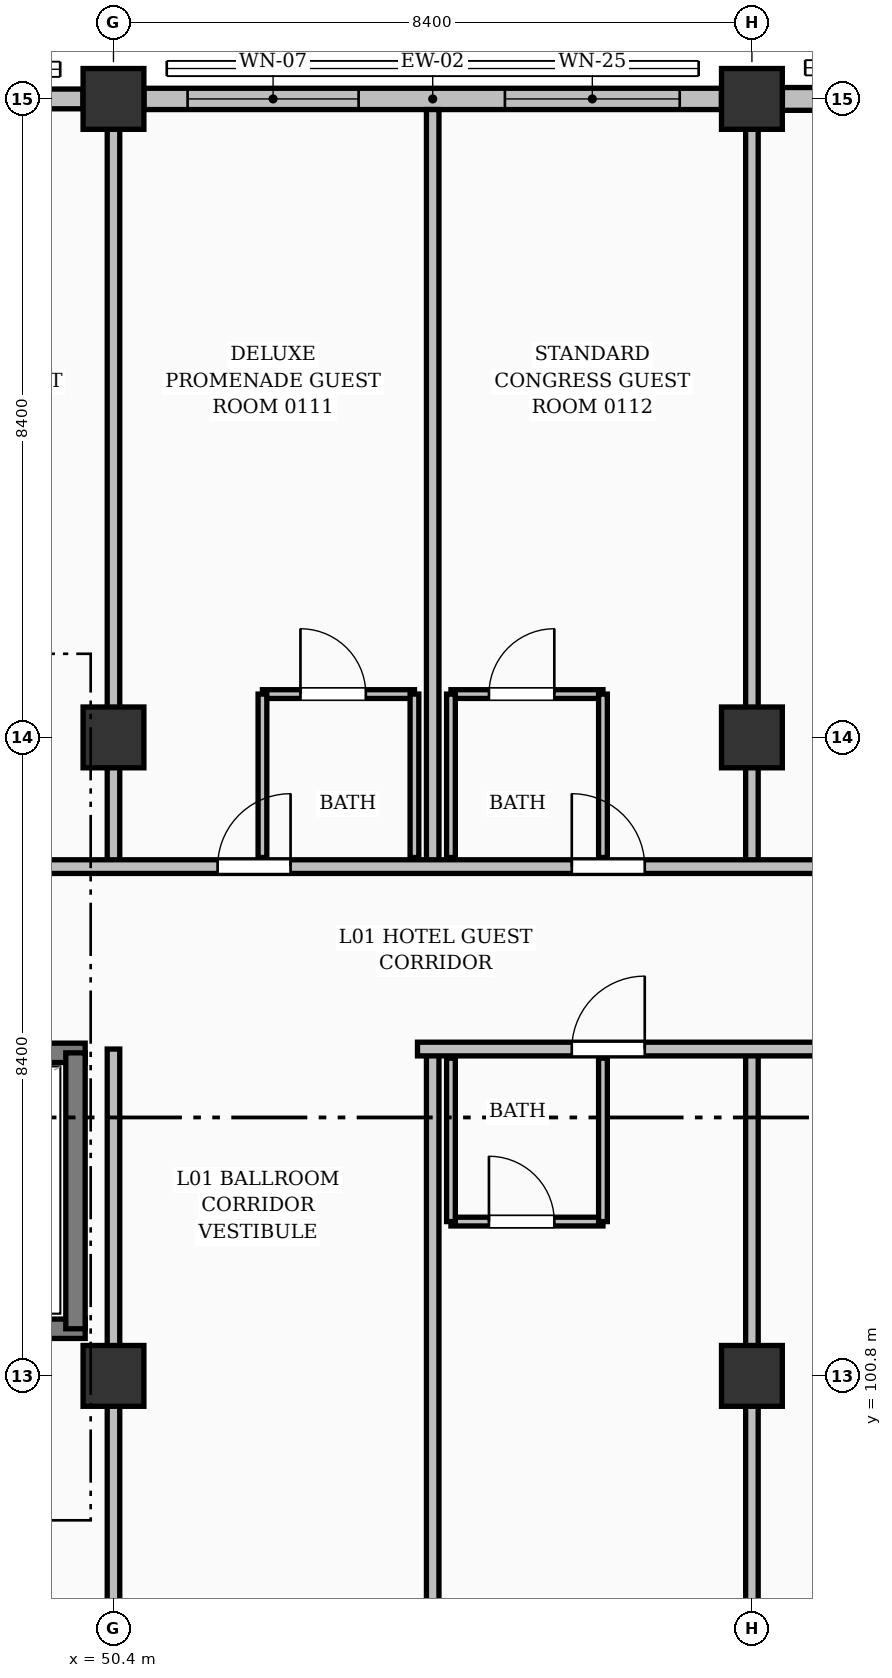
"""IFC4 building model, lengths in metres.
Left out: names, types, materials, properties, quantities, classifications, styles, units other than length and angle.
Written with IfcOpenShell. Run it as: python <this file> out.ifc"""

import sys

from ifc_helpers import new_model, si_unit, direction, frame, frame_2d, origin, origin_2d, place, context, subcontext, project, spatial, rectangle, extrude, element, fill, save


model = new_model("IFC4")
c1 = context("Model", 3, precision=1e-05, world=origin(), true_north=direction((0.0, 1.0)))
c2 = subcontext(c1, "Body", "Model", "MODEL_VIEW")
j1 = project(units=[si_unit("LENGTHUNIT", "METRE"), si_unit("PLANEANGLEUNIT", "RADIAN")], contexts=[c1])
p1 = place(None, origin())
s1 = spatial("IfcSite", under=j1, at=p1, CompositionType="ELEMENT")
p2 = place(p1, origin())
s2 = spatial("IfcBuilding", under=s1, at=p2, CompositionType="ELEMENT")
p3 = place(p2, frame((0.0, 0.0, 3.92)))
s3 = spatial("IfcBuildingStorey", under=s2, at=p3, CompositionType="ELEMENT", Elevation=3.92)
for number, where, z_axis, x_axis in (
    (1, (50.4, 100.8, 0.0), (0.0, 0.0, 1.0), (1.0, 0.0, 0.0)),
    (2, (50.4, 109.2, 0.0), (0.0, 0.0, 1.0), (1.0, 0.0, 0.0)),
    (3, (50.4, 117.6, 0.0), (0.0, 0.0, 1.0), (1.0, 0.0, 0.0)),
    (4, (58.8, 100.8, 0.0), (0.0, 0.0, 1.0), (1.0, 0.0, 0.0)),
    (5, (58.8, 109.2, 0.0), (0.0, 0.0, 1.0), (1.0, 0.0, 0.0)),
    (6, (58.8, 117.6, 0.0), (0.0, 0.0, 1.0), (1.0, 0.0, 0.0)),
):
    element("IfcColumn", number, at=place(p3, frame(where, z_axis=z_axis, x_axis=x_axis)), inside=s3, PredefinedType="COLUMN", context=c2, shape_type="SweptSolid", body=[
        extrude(rectangle(XDim=0.8, YDim=0.8, at=origin_2d()), origin(), (0.0, 0.0, 1.0), 3.64),
    ])
p4 = place(p3, frame((42.401, 117.6, 0.0), z_axis=(0.0, 0.0, 1.0), x_axis=(1.0, 0.0, 0.0)))
e7 = element("IfcWall", 7, at=p4, inside=s3, PredefinedType="SOLIDWALL", context=c2, shape_type="SweptSolid", body=[
    extrude(rectangle(XDim=7.598, YDim=0.26, at=frame_2d((3.799, 0.0))), origin(), (0.0, 0.0, 1.0), 2.445),
])
p5 = place(p4, frame((0.574, 0.0, 0.25)))
e8 = element("IfcOpeningElement", 8, at=p5, cuts=e7, PredefinedType="OPENING", context=c2, shape_type="SweptSolid", body=[
    extrude(rectangle(XDim=2.25, YDim=1.85, at=frame_2d((1.125, 0.925))), frame((0.0, 0.14, 0.0), z_axis=(0.0, -1.0, 0.0), x_axis=(1.0, 0.0, 0.0)), (0.0, 0.0, 1.0), 0.28),
])
p6 = place(p4, frame((4.774, 0.0, 0.25)))
e9 = element("IfcOpeningElement", 9, at=p6, cuts=e7, PredefinedType="OPENING", context=c2, shape_type="SweptSolid", body=[
    extrude(rectangle(XDim=2.25, YDim=1.95, at=frame_2d((1.125, 0.975))), frame((0.0, 0.14, 0.0), z_axis=(0.0, -1.0, 0.0), x_axis=(1.0, 0.0, 0.0)), (0.0, 0.0, 1.0), 0.28),
])
p7 = place(p3, frame((50.801, 117.6, 0.0), z_axis=(0.0, 0.0, 1.0), x_axis=(1.0, 0.0, 0.0)))
e10 = element("IfcWall", 10, at=p7, inside=s3, PredefinedType="SOLIDWALL", context=c2, shape_type="SweptSolid", body=[
    extrude(rectangle(XDim=7.598, YDim=0.28, at=frame_2d((3.799, 0.0))), origin(), (0.0, 0.0, 1.0), 2.445),
])
p8 = place(p7, frame((0.574, 0.0, 0.25)))
e11 = element("IfcOpeningElement", 11, at=p8, cuts=e10, PredefinedType="OPENING", context=c2, shape_type="SweptSolid", body=[
    extrude(rectangle(XDim=2.25, YDim=1.95, at=frame_2d((1.125, 0.975))), frame((0.0, 0.15, 0.0), z_axis=(0.0, -1.0, 0.0), x_axis=(1.0, 0.0, 0.0)), (0.0, 0.0, 1.0), 0.3),
])
p9 = place(p7, frame((4.749, 0.0, 0.25)))
e12 = element("IfcOpeningElement", 12, at=p9, cuts=e10, PredefinedType="OPENING", context=c2, shape_type="SweptSolid", body=[
    extrude(rectangle(XDim=2.3, YDim=1.75, at=frame_2d((1.15, 0.875))), frame((0.0, 0.15, 0.0), z_axis=(0.0, -1.0, 0.0), x_axis=(1.0, 0.0, 0.0)), (0.0, 0.0, 1.0), 0.3),
])
p10 = place(p3, frame((59.201, 117.6, 0.0), z_axis=(0.0, 0.0, 1.0), x_axis=(1.0, 0.0, 0.0)))
e13 = element("IfcWall", 13, at=p10, inside=s3, PredefinedType="SOLIDWALL", context=c2, shape_type="SweptSolid", body=[
    extrude(rectangle(XDim=7.598, YDim=0.3, at=frame_2d((3.799, 0.0))), origin(), (0.0, 0.0, 1.0), 2.445),
])
p11 = place(p10, frame((0.549, 0.0, 0.25)))
e14 = element("IfcOpeningElement", 14, at=p11, cuts=e13, PredefinedType="OPENING", context=c2, shape_type="SweptSolid", body=[
    extrude(rectangle(XDim=2.3, YDim=1.75, at=frame_2d((1.15, 0.875))), frame((0.0, 0.16, 0.0), z_axis=(0.0, -1.0, 0.0), x_axis=(1.0, 0.0, 0.0)), (0.0, 0.0, 1.0), 0.32),
])
p12 = place(p10, frame((4.789, 0.0, 0.25)))
e15 = element("IfcOpeningElement", 15, at=p12, cuts=e13, PredefinedType="OPENING", context=c2, shape_type="SweptSolid", body=[
    extrude(rectangle(XDim=2.22, YDim=1.9, at=frame_2d((1.11, 0.95))), frame((0.0, 0.16, 0.0), z_axis=(0.0, -1.0, 0.0), x_axis=(1.0, 0.0, 0.0)), (0.0, 0.0, 1.0), 0.32),
])
p13 = place(p3, frame((41.802, 101.42, 0.0), z_axis=(0.0, 0.0, 1.0), x_axis=(1.0, 0.0, 0.0)))
e16 = element("IfcWall", 16, at=p13, inside=s3, PredefinedType="SOLIDWALL", context=c2, shape_type="SweptSolid", body=[
    extrude(rectangle(XDim=8.225, YDim=0.255, at=frame_2d((4.113, 0.0))), origin(), (0.0, 0.0, 1.0), 3.36),
])
p14 = place(p3, frame((41.802, 105.05, 0.0), z_axis=(0.0, 0.0, 1.0), x_axis=(1.0, 0.0, 0.0)))
e17 = element("IfcWall", 17, at=p14, inside=s3, PredefinedType="SOLIDWALL", context=c2, shape_type="SweptSolid", body=[
    extrude(rectangle(XDim=8.225, YDim=0.255, at=frame_2d((4.113, 0.0))), origin(), (0.0, 0.0, 1.0), 3.36),
])
p15 = place(p14, frame((0.35, 0.0, 0.0)))
e18 = element("IfcOpeningElement", 18, at=p15, cuts=e17, PredefinedType="OPENING", context=c2, shape_type="SweptSolid", body=[
    extrude(rectangle(XDim=1.16, YDim=2.15, at=frame_2d((0.58, 1.075))), frame((0.0, 0.137, 0.0), z_axis=(0.0, -1.0, 0.0), x_axis=(1.0, 0.0, 0.0)), (0.0, 0.0, 1.0), 0.275),
])
p16 = place(p3, frame((49.9, 101.42, 0.0), z_axis=(0.0, 0.0, 1.0), x_axis=(0.0, 1.0, 0.0)))
e19 = element("IfcWall", 19, at=p16, inside=s3, PredefinedType="SOLIDWALL", context=c2, shape_type="SweptSolid", body=[
    extrude(rectangle(XDim=3.63, YDim=0.255, at=frame_2d((1.815, 0.0))), origin(), (0.0, 0.0, 1.0), 3.36),
])
p17 = place(p3, frame((52.36, 109.77, 0.0), z_axis=(0.0, 0.0, 1.0), x_axis=(1.0, 0.0, 0.0)))
e20 = element("IfcWall", 20, at=p17, inside=s3, PredefinedType="PARTITIONING", context=c2, shape_type="SweptSolid", body=[
    extrude(rectangle(XDim=2.0, YDim=0.115, at=frame_2d((1.0, 0.0))), origin(), (0.0, 0.0, 1.0), 3.36),
])
p18 = place(p17, frame((0.5, 0.0, 0.0)))
e21 = element("IfcOpeningElement", 21, at=p18, cuts=e20, PredefinedType="OPENING", context=c2, shape_type="SweptSolid", body=[
    extrude(rectangle(XDim=0.86, YDim=2.05, at=frame_2d((0.43, 1.025))), frame((0.0, 0.067, 0.0), z_axis=(0.0, -1.0, 0.0), x_axis=(1.0, 0.0, 0.0)), (0.0, 0.0, 1.0), 0.135),
])
for number, where, z_axis, x_axis in (
    (22, (52.36, 107.62, 0.0), (0.0, 0.0, 1.0), (0.0, 1.0, 0.0)),
    (23, (54.36, 107.62, 0.0), (0.0, 0.0, 1.0), (0.0, 1.0, 0.0)),
):
    element("IfcWall", number, at=place(p3, frame(where, z_axis=z_axis, x_axis=x_axis)), inside=s3, PredefinedType="PARTITIONING", context=c2, shape_type="SweptSolid", body=[
        extrude(rectangle(XDim=2.15, YDim=0.115, at=frame_2d((1.075, 0.0))), origin(), (0.0, 0.0, 1.0), 3.36),
    ])
p19 = place(p3, frame((54.84, 109.77, 0.0), z_axis=(0.0, 0.0, 1.0), x_axis=(1.0, 0.0, 0.0)))
e24 = element("IfcWall", 24, at=p19, inside=s3, PredefinedType="PARTITIONING", context=c2, shape_type="SweptSolid", body=[
    extrude(rectangle(XDim=2.0, YDim=0.115, at=frame_2d((1.0, 0.0))), origin(), (0.0, 0.0, 1.0), 3.36),
])
p20 = place(p19, frame((0.5, 0.0, 0.0)))
e25 = element("IfcOpeningElement", 25, at=p20, cuts=e24, PredefinedType="OPENING", context=c2, shape_type="SweptSolid", body=[
    extrude(rectangle(XDim=0.86, YDim=2.05, at=frame_2d((0.43, 1.025))), frame((0.0, 0.067, 0.0), z_axis=(0.0, -1.0, 0.0), x_axis=(1.0, 0.0, 0.0)), (0.0, 0.0, 1.0), 0.135),
])
for number, where, z_axis, x_axis in (
    (26, (54.84, 107.62, 0.0), (0.0, 0.0, 1.0), (0.0, 1.0, 0.0)),
    (27, (56.84, 107.62, 0.0), (0.0, 0.0, 1.0), (0.0, 1.0, 0.0)),
):
    element("IfcWall", number, at=place(p3, frame(where, z_axis=z_axis, x_axis=x_axis)), inside=s3, PredefinedType="PARTITIONING", context=c2, shape_type="SweptSolid", body=[
        extrude(rectangle(XDim=2.15, YDim=0.115, at=frame_2d((1.075, 0.0))), origin(), (0.0, 0.0, 1.0), 3.36),
    ])
p21 = place(p3, frame((54.6, 107.5, 0.0), z_axis=(0.0, 0.0, 1.0), x_axis=(0.0, 1.0, 0.0)))
e28 = element("IfcWall", 28, at=p21, inside=s3, PredefinedType="PARTITIONING", context=c2, shape_type="SweptSolid", body=[
    extrude(rectangle(XDim=9.96, YDim=0.165, at=frame_2d((4.98, 0.0))), origin(), (0.0, 0.0, 1.0), 3.36),
])
for number, where, z_axis, x_axis in (
    (29, (50.4, 107.5, 0.0), (0.0, 0.0, 1.0), (0.0, 1.0, 0.0)),
    (30, (58.8, 107.5, 0.0), (0.0, 0.0, 1.0), (0.0, 1.0, 0.0)),
):
    element("IfcWall", number, at=place(p3, frame(where, z_axis=z_axis, x_axis=x_axis)), inside=s3, PredefinedType="PARTITIONING", context=c2, shape_type="SweptSolid", body=[
        extrude(rectangle(XDim=9.75, YDim=0.165, at=frame_2d((4.875, 0.0))), origin(), (0.0, 0.0, 1.0), 2.495),
    ])
p22 = place(p3, frame((40.66, 107.5, 0.0), z_axis=(0.0, 0.0, 1.0), x_axis=(1.0, 0.0, 0.0)))
e31 = element("IfcWall", 31, at=p22, inside=s3, PredefinedType="PARTITIONING", context=c2, shape_type="SweptSolid", body=[
    extrude(rectangle(XDim=43.15, YDim=0.18, at=frame_2d((21.575, 0.0))), origin(), (0.0, 0.0, 1.0), 3.36),
])
p23 = place(p22, frame((0.2, 0.0, 0.0)))
e32 = element("IfcOpeningElement", 32, at=p23, cuts=e31, PredefinedType="OPENING", context=c2, shape_type="SweptSolid", body=[
    extrude(rectangle(XDim=0.94, YDim=2.1, at=frame_2d((0.47, 1.05))), frame((0.0, 0.1, 0.0), z_axis=(0.0, -1.0, 0.0), x_axis=(1.0, 0.0, 0.0)), (0.0, 0.0, 1.0), 0.2),
])
p24 = place(p22, frame((2.71, 0.0, 0.0)))
e33 = element("IfcOpeningElement", 33, at=p24, cuts=e31, PredefinedType="OPENING", context=c2, shape_type="SweptSolid", body=[
    extrude(rectangle(XDim=0.96, YDim=2.15, at=frame_2d((0.48, 1.075))), frame((0.0, 0.1, 0.0), z_axis=(0.0, -1.0, 0.0), x_axis=(1.0, 0.0, 0.0)), (0.0, 0.0, 1.0), 0.2),
])
p25 = place(p22, frame((7.37, 0.0, 0.0)))
e34 = element("IfcOpeningElement", 34, at=p25, cuts=e31, PredefinedType="OPENING", context=c2, shape_type="SweptSolid", body=[
    extrude(rectangle(XDim=0.96, YDim=2.15, at=frame_2d((0.48, 1.075))), frame((0.0, 0.1, 0.0), z_axis=(0.0, -1.0, 0.0), x_axis=(1.0, 0.0, 0.0)), (0.0, 0.0, 1.0), 0.2),
])
p26 = place(p22, frame((11.11, 0.0, 0.0)))
e35 = element("IfcOpeningElement", 35, at=p26, cuts=e31, PredefinedType="OPENING", context=c2, shape_type="SweptSolid", body=[
    extrude(rectangle(XDim=0.96, YDim=2.15, at=frame_2d((0.48, 1.075))), frame((0.0, 0.1, 0.0), z_axis=(0.0, -1.0, 0.0), x_axis=(1.0, 0.0, 0.0)), (0.0, 0.0, 1.0), 0.2),
])
p27 = place(p22, frame((15.77, 0.0, 0.0)))
e36 = element("IfcOpeningElement", 36, at=p27, cuts=e31, PredefinedType="OPENING", context=c2, shape_type="SweptSolid", body=[
    extrude(rectangle(XDim=0.96, YDim=2.15, at=frame_2d((0.48, 1.075))), frame((0.0, 0.1, 0.0), z_axis=(0.0, -1.0, 0.0), x_axis=(1.0, 0.0, 0.0)), (0.0, 0.0, 1.0), 0.2),
])
p28 = place(p22, frame((19.51, 0.0, 0.0)))
e37 = element("IfcOpeningElement", 37, at=p28, cuts=e31, PredefinedType="OPENING", context=c2, shape_type="SweptSolid", body=[
    extrude(rectangle(XDim=0.96, YDim=2.15, at=frame_2d((0.48, 1.075))), frame((0.0, 0.1, 0.0), z_axis=(0.0, -1.0, 0.0), x_axis=(1.0, 0.0, 0.0)), (0.0, 0.0, 1.0), 0.2),
])
p29 = place(p22, frame((24.17, 0.0, 0.0)))
e38 = element("IfcOpeningElement", 38, at=p29, cuts=e31, PredefinedType="OPENING", context=c2, shape_type="SweptSolid", body=[
    extrude(rectangle(XDim=0.96, YDim=2.15, at=frame_2d((0.48, 1.075))), frame((0.0, 0.1, 0.0), z_axis=(0.0, -1.0, 0.0), x_axis=(1.0, 0.0, 0.0)), (0.0, 0.0, 1.0), 0.2),
])
p30 = place(p22, frame((27.91, 0.0, 0.0)))
e39 = element("IfcOpeningElement", 39, at=p30, cuts=e31, PredefinedType="OPENING", context=c2, shape_type="SweptSolid", body=[
    extrude(rectangle(XDim=0.96, YDim=2.15, at=frame_2d((0.48, 1.075))), frame((0.0, 0.1, 0.0), z_axis=(0.0, -1.0, 0.0), x_axis=(1.0, 0.0, 0.0)), (0.0, 0.0, 1.0), 0.2),
])
p31 = place(p22, frame((32.57, 0.0, 0.0)))
e40 = element("IfcOpeningElement", 40, at=p31, cuts=e31, PredefinedType="OPENING", context=c2, shape_type="SweptSolid", body=[
    extrude(rectangle(XDim=0.96, YDim=2.15, at=frame_2d((0.48, 1.075))), frame((0.0, 0.1, 0.0), z_axis=(0.0, -1.0, 0.0), x_axis=(1.0, 0.0, 0.0)), (0.0, 0.0, 1.0), 0.2),
])
p32 = place(p22, frame((36.31, 0.0, 0.0)))
e41 = element("IfcOpeningElement", 41, at=p32, cuts=e31, PredefinedType="OPENING", context=c2, shape_type="SweptSolid", body=[
    extrude(rectangle(XDim=0.96, YDim=2.15, at=frame_2d((0.48, 1.075))), frame((0.0, 0.1, 0.0), z_axis=(0.0, -1.0, 0.0), x_axis=(1.0, 0.0, 0.0)), (0.0, 0.0, 1.0), 0.2),
])
p33 = place(p22, frame((40.97, 0.0, 0.0)))
e42 = element("IfcOpeningElement", 42, at=p33, cuts=e31, PredefinedType="OPENING", context=c2, shape_type="SweptSolid", body=[
    extrude(rectangle(XDim=0.96, YDim=2.15, at=frame_2d((0.48, 1.075))), frame((0.0, 0.1, 0.0), z_axis=(0.0, -1.0, 0.0), x_axis=(1.0, 0.0, 0.0)), (0.0, 0.0, 1.0), 0.2),
])
p34 = place(p3, frame((54.84, 102.83, 0.0), z_axis=(0.0, 0.0, 1.0), x_axis=(1.0, 0.0, 0.0)))
e43 = element("IfcWall", 43, at=p34, inside=s3, PredefinedType="PARTITIONING", context=c2, shape_type="SweptSolid", body=[
    extrude(rectangle(XDim=2.0, YDim=0.115, at=frame_2d((1.0, 0.0))), origin(), (0.0, 0.0, 1.0), 3.36),
])
p35 = place(p34, frame((0.5, 0.0, 0.0)))
e44 = element("IfcOpeningElement", 44, at=p35, cuts=e43, PredefinedType="OPENING", context=c2, shape_type="SweptSolid", body=[
    extrude(rectangle(XDim=0.86, YDim=2.05, at=frame_2d((0.43, 1.025))), frame((0.0, 0.067, 0.0), z_axis=(0.0, -1.0, 0.0), x_axis=(1.0, 0.0, 0.0)), (0.0, 0.0, 1.0), 0.135),
])
for number, where, z_axis, x_axis in (
    (45, (54.84, 102.83, 0.0), (0.0, 0.0, 1.0), (0.0, 1.0, 0.0)),
    (46, (56.84, 102.83, 0.0), (0.0, 0.0, 1.0), (0.0, 1.0, 0.0)),
):
    element("IfcWall", number, at=place(p3, frame(where, z_axis=z_axis, x_axis=x_axis)), inside=s3, PredefinedType="PARTITIONING", context=c2, shape_type="SweptSolid", body=[
        extrude(rectangle(XDim=2.15, YDim=0.115, at=frame_2d((1.075, 0.0))), origin(), (0.0, 0.0, 1.0), 3.36),
    ])
p36 = place(p3, frame((54.6, 84.14, 0.0), z_axis=(0.0, 0.0, 1.0), x_axis=(0.0, 1.0, 0.0)))
e47 = element("IfcWall", 47, at=p36, inside=s3, PredefinedType="PARTITIONING", context=c2, shape_type="SweptSolid", body=[
    extrude(rectangle(XDim=20.96, YDim=0.165, at=frame_2d((10.48, 0.0))), origin(), (0.0, 0.0, 1.0), 3.36),
])
for number, where, z_axis, x_axis in (
    (48, (50.4, 84.35, 0.0), (0.0, 0.0, 1.0), (0.0, 1.0, 0.0)),
    (49, (58.8, 84.35, 0.0), (0.0, 0.0, 1.0), (0.0, 1.0, 0.0)),
):
    element("IfcWall", number, at=place(p3, frame(where, z_axis=z_axis, x_axis=x_axis)), inside=s3, PredefinedType="PARTITIONING", context=c2, shape_type="SweptSolid", body=[
        extrude(rectangle(XDim=20.75, YDim=0.165, at=frame_2d((10.375, 0.0))), origin(), (0.0, 0.0, 1.0), 2.495),
    ])
p37 = place(p3, frame((54.4, 105.1, 0.0), z_axis=(0.0, 0.0, 1.0), x_axis=(1.0, 0.0, 0.0)))
e50 = element("IfcWall", 50, at=p37, inside=s3, PredefinedType="PARTITIONING", context=c2, shape_type="SweptSolid", body=[
    extrude(rectangle(XDim=29.41, YDim=0.18, at=frame_2d((14.705, 0.0))), origin(), (0.0, 0.0, 1.0), 3.36),
])
p38 = place(p37, frame((2.03, 0.0, 0.0)))
e51 = element("IfcOpeningElement", 51, at=p38, cuts=e50, PredefinedType="OPENING", context=c2, shape_type="SweptSolid", body=[
    extrude(rectangle(XDim=0.96, YDim=2.15, at=frame_2d((0.48, 1.075))), frame((0.0, 0.1, 0.0), z_axis=(0.0, -1.0, 0.0), x_axis=(1.0, 0.0, 0.0)), (0.0, 0.0, 1.0), 0.2),
])
p39 = place(p37, frame((5.77, 0.0, 0.0)))
e52 = element("IfcOpeningElement", 52, at=p39, cuts=e50, PredefinedType="OPENING", context=c2, shape_type="SweptSolid", body=[
    extrude(rectangle(XDim=0.96, YDim=2.15, at=frame_2d((0.48, 1.075))), frame((0.0, 0.1, 0.0), z_axis=(0.0, -1.0, 0.0), x_axis=(1.0, 0.0, 0.0)), (0.0, 0.0, 1.0), 0.2),
])
p40 = place(p37, frame((10.43, 0.0, 0.0)))
e53 = element("IfcOpeningElement", 53, at=p40, cuts=e50, PredefinedType="OPENING", context=c2, shape_type="SweptSolid", body=[
    extrude(rectangle(XDim=0.96, YDim=2.15, at=frame_2d((0.48, 1.075))), frame((0.0, 0.1, 0.0), z_axis=(0.0, -1.0, 0.0), x_axis=(1.0, 0.0, 0.0)), (0.0, 0.0, 1.0), 0.2),
])
p41 = place(p37, frame((14.17, 0.0, 0.0)))
e54 = element("IfcOpeningElement", 54, at=p41, cuts=e50, PredefinedType="OPENING", context=c2, shape_type="SweptSolid", body=[
    extrude(rectangle(XDim=0.96, YDim=2.15, at=frame_2d((0.48, 1.075))), frame((0.0, 0.1, 0.0), z_axis=(0.0, -1.0, 0.0), x_axis=(1.0, 0.0, 0.0)), (0.0, 0.0, 1.0), 0.2),
])
p42 = place(p37, frame((18.83, 0.0, 0.0)))
e55 = element("IfcOpeningElement", 55, at=p42, cuts=e50, PredefinedType="OPENING", context=c2, shape_type="SweptSolid", body=[
    extrude(rectangle(XDim=0.96, YDim=2.15, at=frame_2d((0.48, 1.075))), frame((0.0, 0.1, 0.0), z_axis=(0.0, -1.0, 0.0), x_axis=(1.0, 0.0, 0.0)), (0.0, 0.0, 1.0), 0.2),
])
p43 = place(p37, frame((22.57, 0.0, 0.0)))
e56 = element("IfcOpeningElement", 56, at=p43, cuts=e50, PredefinedType="OPENING", context=c2, shape_type="SweptSolid", body=[
    extrude(rectangle(XDim=0.96, YDim=2.15, at=frame_2d((0.48, 1.075))), frame((0.0, 0.1, 0.0), z_axis=(0.0, -1.0, 0.0), x_axis=(1.0, 0.0, 0.0)), (0.0, 0.0, 1.0), 0.2),
])
p44 = place(p37, frame((27.23, 0.0, 0.0)))
e57 = element("IfcOpeningElement", 57, at=p44, cuts=e50, PredefinedType="OPENING", context=c2, shape_type="SweptSolid", body=[
    extrude(rectangle(XDim=0.96, YDim=2.15, at=frame_2d((0.48, 1.075))), frame((0.0, 0.1, 0.0), z_axis=(0.0, -1.0, 0.0), x_axis=(1.0, 0.0, 0.0)), (0.0, 0.0, 1.0), 0.2),
])
p45 = place(p8, origin())
e58 = element("IfcWindow", 58, at=p45, inside=s3, PartitioningType="DOUBLE_PANEL_VERTICAL", PredefinedType="WINDOW", context=c2, shape_type="SweptSolid", body=[
    extrude(rectangle(XDim=2.25, YDim=1.95, at=frame_2d((1.125, 0.975))), frame((0.0, 0.03, 0.0), z_axis=(0.0, -1.0, 0.0), x_axis=(1.0, 0.0, 0.0)), (0.0, 0.0, 1.0), 0.06),
])
fill(e11, e58)
p46 = place(p9, origin())
e59 = element("IfcWindow", 59, at=p46, inside=s3, PartitioningType="DOUBLE_PANEL_VERTICAL", PredefinedType="WINDOW", context=c2, shape_type="SweptSolid", body=[
    extrude(rectangle(XDim=2.3, YDim=1.75, at=frame_2d((1.15, 0.875))), frame((0.0, 0.03, 0.0), z_axis=(0.0, -1.0, 0.0), x_axis=(1.0, 0.0, 0.0)), (0.0, 0.0, 1.0), 0.06),
])
fill(e12, e59)
p47 = place(p18, origin())
e60 = element("IfcDoor", 60, at=p47, inside=s3, OperationType="SINGLE_SWING_LEFT", PredefinedType="DOOR", context=c2, shape_type="SweptSolid", body=[
    extrude(rectangle(XDim=0.86, YDim=2.05, at=frame_2d((0.43, 1.025))), frame((0.0, 0.025, 0.0), z_axis=(0.0, -1.0, 0.0), x_axis=(1.0, 0.0, 0.0)), (0.0, 0.0, 1.0), 0.05),
])
fill(e21, e60)
p48 = place(p20, origin())
e61 = element("IfcDoor", 61, at=p48, inside=s3, OperationType="SINGLE_SWING_RIGHT", PredefinedType="DOOR", context=c2, shape_type="SweptSolid", body=[
    extrude(rectangle(XDim=0.86, YDim=2.05, at=frame_2d((0.43, 1.025))), frame((0.0, 0.025, 0.0), z_axis=(0.0, -1.0, 0.0), x_axis=(1.0, 0.0, 0.0)), (0.0, 0.0, 1.0), 0.05),
])
fill(e25, e61)
p49 = place(p26, origin())
e62 = element("IfcDoor", 62, at=p49, inside=s3, OperationType="SINGLE_SWING_RIGHT", PredefinedType="DOOR", context=c2, shape_type="SweptSolid", body=[
    extrude(rectangle(XDim=0.96, YDim=2.15, at=frame_2d((0.48, 1.075))), frame((0.0, 0.025, 0.0), z_axis=(0.0, -1.0, 0.0), x_axis=(1.0, 0.0, 0.0)), (0.0, 0.0, 1.0), 0.05),
])
fill(e35, e62)
p50 = place(p27, origin())
e63 = element("IfcDoor", 63, at=p50, inside=s3, OperationType="SINGLE_SWING_LEFT", PredefinedType="DOOR", context=c2, shape_type="SweptSolid", body=[
    extrude(rectangle(XDim=0.96, YDim=2.15, at=frame_2d((0.48, 1.075))), frame((0.0, 0.025, 0.0), z_axis=(0.0, -1.0, 0.0), x_axis=(1.0, 0.0, 0.0)), (0.0, 0.0, 1.0), 0.05),
])
fill(e36, e63)
p51 = place(p35, origin())
e64 = element("IfcDoor", 64, at=p51, inside=s3, OperationType="SINGLE_SWING_LEFT", PredefinedType="DOOR", context=c2, shape_type="SweptSolid", body=[
    extrude(rectangle(XDim=0.86, YDim=2.05, at=frame_2d((0.43, 1.025))), frame((0.0, 0.025, 0.0), z_axis=(0.0, -1.0, 0.0), x_axis=(1.0, 0.0, 0.0)), (0.0, 0.0, 1.0), 0.05),
])
fill(e44, e64)
p52 = place(p38, origin())
e65 = element("IfcDoor", 65, at=p52, inside=s3, OperationType="SINGLE_SWING_RIGHT", PredefinedType="DOOR", context=c2, shape_type="SweptSolid", body=[
    extrude(rectangle(XDim=0.96, YDim=2.15, at=frame_2d((0.48, 1.075))), frame((0.0, 0.025, 0.0), z_axis=(0.0, -1.0, 0.0), x_axis=(1.0, 0.0, 0.0)), (0.0, 0.0, 1.0), 0.05),
])
fill(e51, e65)
save(model, sys.argv[1])
